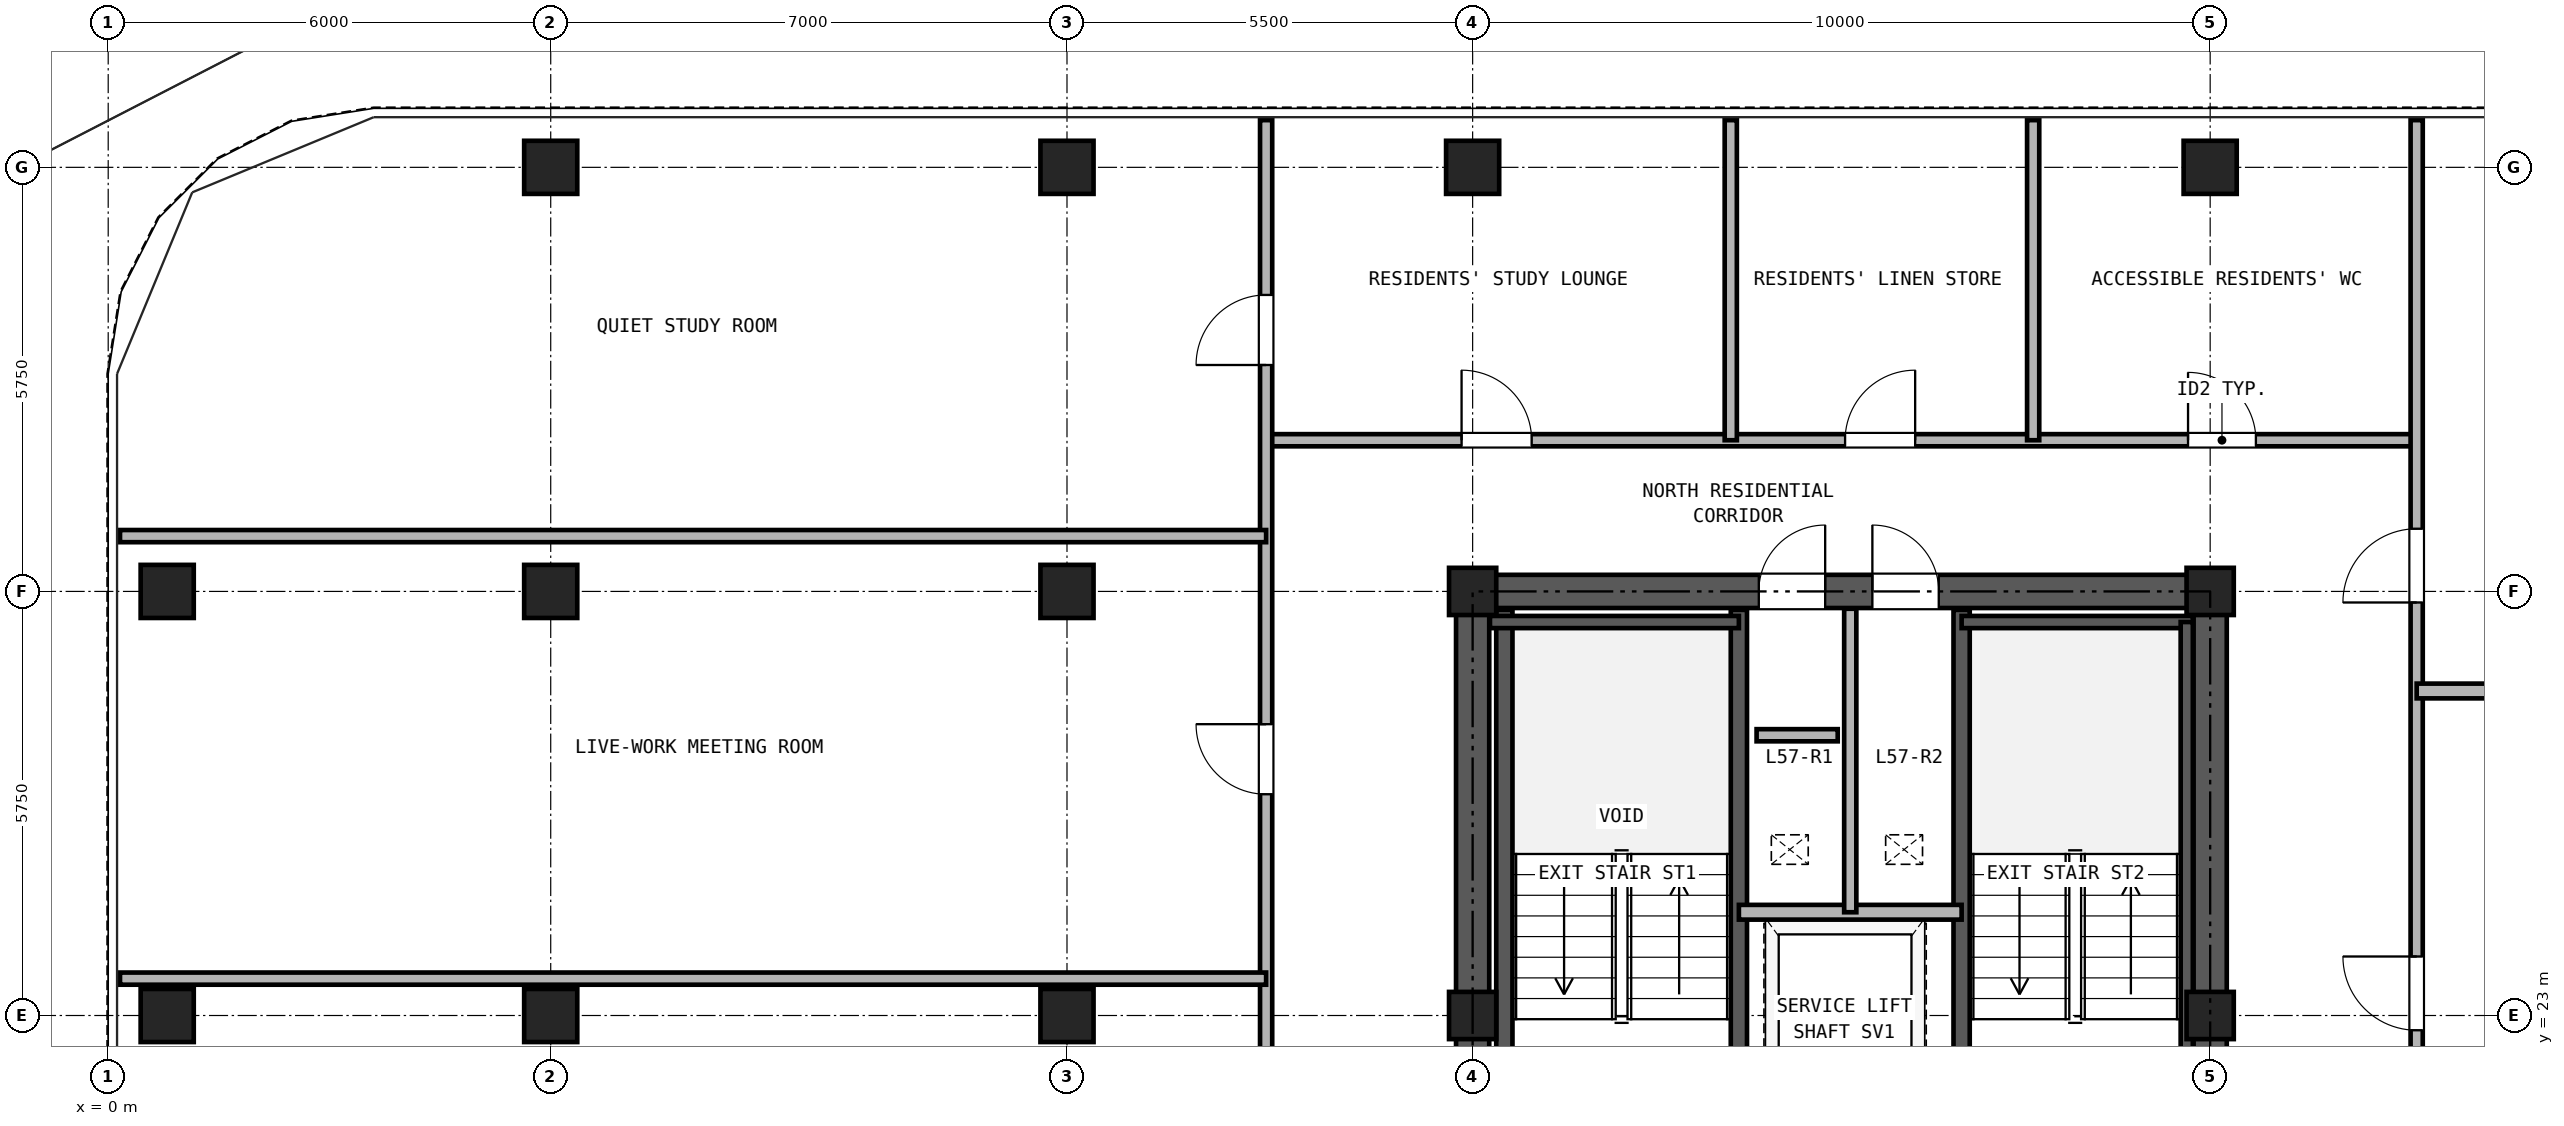
"""IFC4 building model, lengths in metres.
Left out: names, types, materials, properties, quantities, classifications, styles, units other than length and angle.
Written with IfcOpenShell. Run it as: python <this file> out.ifc"""

import sys

from ifc_helpers import new_model, si_unit, direction, frame, frame_2d, origin, origin_2d, place, context, subcontext, project, spatial, rectangle, hollow_rectangle, extrude, source, transform, mapped, element, fill, save


model = new_model("IFC4")
c1 = context("Model", 3, precision=1e-05, world=origin(), true_north=direction((0.0, 1.0)))
c2 = subcontext(c1, "Body", "Model", "MODEL_VIEW")
j1 = project(units=[si_unit("LENGTHUNIT", "METRE"), si_unit("PLANEANGLEUNIT", "RADIAN")], contexts=[c1])
p1 = place(None, origin())
s1 = spatial("IfcSite", under=j1, at=p1, CompositionType="ELEMENT")
p2 = place(p1, origin())
s2 = spatial("IfcBuilding", under=s1, at=p2, CompositionType="ELEMENT")
p3 = place(p2, frame((0.0, 0.0, 202.8)))
s3 = spatial("IfcBuildingStorey", under=s2, at=p3, CompositionType="ELEMENT", Elevation=202.8)
m1 = source(origin(), c2, "Body", "SweptSolid", [
    extrude(hollow_rectangle(XDim=0.72, YDim=0.72, WallThickness=0.04, at=origin_2d()), origin(), (0.0, 0.0, 1.0), 2.95),
])
for number, where, z_axis, x_axis in (
    (1, (6.0, 34.5, 0.0), (0.0, 0.0, 1.0), (1.0, 0.0, 0.0)),
    (2, (13.0, 34.5, 0.0), (0.0, 0.0, 1.0), (1.0, 0.0, 0.0)),
    (3, (18.5, 34.5, 0.0), (0.0, 0.0, 1.0), (1.0, 0.0, 0.0)),
    (4, (28.5, 34.5, 0.0), (0.0, 0.0, 1.0), (1.0, 0.0, 0.0)),
    (5, (0.8, 23.0, 0.0), (0.0, 0.0, 1.0), (1.0, 0.0, 0.0)),
    (6, (0.8, 28.75, 0.0), (0.0, 0.0, 1.0), (1.0, 0.0, 0.0)),
    (7, (6.0, 23.0, 0.0), (0.0, 0.0, 1.0), (1.0, 0.0, 0.0)),
    (8, (6.0, 28.75, 0.0), (0.0, 0.0, 1.0), (1.0, 0.0, 0.0)),
    (9, (13.0, 23.0, 0.0), (0.0, 0.0, 1.0), (1.0, 0.0, 0.0)),
    (10, (13.0, 28.75, 0.0), (0.0, 0.0, 1.0), (1.0, 0.0, 0.0)),
):
    element("IfcColumn", number, at=place(p3, frame(where, z_axis=z_axis, x_axis=x_axis)), inside=s3, PredefinedType="COLUMN", context=c2, shape_type="MappedRepresentation", body=[
        mapped(m1, transform((0.0, 0.0, 0.0), x_axis=(1.0, 0.0, 0.0), y_axis=(0.0, 1.0, 0.0), z_axis=(0.0, 0.0, 1.0), scale=1.0)),
    ])
m2 = source(origin(), c2, "Body", "SweptSolid", [
    extrude(hollow_rectangle(XDim=0.64, YDim=0.64, WallThickness=0.035, at=origin_2d()), origin(), (0.0, 0.0, 1.0), 2.95),
])
for number, where, z_axis, x_axis in (
    (11, (18.5, 23.0, 0.0), (0.0, 0.0, 1.0), (1.0, 0.0, 0.0)),
    (12, (18.5, 28.75, 0.0), (0.0, 0.0, 1.0), (1.0, 0.0, 0.0)),
    (13, (28.5, 23.0, 0.0), (0.0, 0.0, 1.0), (1.0, 0.0, 0.0)),
    (14, (28.5, 28.75, 0.0), (0.0, 0.0, 1.0), (1.0, 0.0, 0.0)),
):
    element("IfcColumn", number, at=place(p3, frame(where, z_axis=z_axis, x_axis=x_axis)), inside=s3, PredefinedType="COLUMN", context=c2, shape_type="MappedRepresentation", body=[
        mapped(m2, transform((0.0, 0.0, 0.0), x_axis=(1.0, 0.0, 0.0), y_axis=(0.0, 1.0, 0.0), z_axis=(0.0, 0.0, 1.0), scale=1.0)),
    ])
p4 = place(p3, frame((18.275, 28.75, 0.0), z_axis=(0.0, 0.0, 1.0), x_axis=(1.0, 0.0, 0.0)))
e15 = element("IfcWall", 15, at=p4, inside=s3, PredefinedType="SHEAR", context=c2, shape_type="SweptSolid", body=[
    extrude(rectangle(XDim=10.45, YDim=0.45, at=frame_2d((5.225, 0.0))), origin(), (0.0, 0.0, 1.0), 2.95),
])
p5 = place(p4, frame((4.105, 0.0, 0.0)))
e16 = element("IfcOpeningElement", 16, at=p5, cuts=e15, PredefinedType="OPENING", context=c2, shape_type="SweptSolid", body=[
    extrude(rectangle(XDim=0.9, YDim=2.05, at=frame_2d((0.45, 1.025))), frame((0.0, 0.235, 0.0), z_axis=(0.0, -1.0, 0.0), x_axis=(1.0, 0.0, 0.0)), (0.0, 0.0, 1.0), 0.47),
])
p6 = place(p4, frame((5.645, 0.0, 0.0)))
e17 = element("IfcOpeningElement", 17, at=p6, cuts=e15, PredefinedType="OPENING", context=c2, shape_type="SweptSolid", body=[
    extrude(rectangle(XDim=0.9, YDim=2.05, at=frame_2d((0.45, 1.025))), frame((0.0, 0.235, 0.0), z_axis=(0.0, -1.0, 0.0), x_axis=(1.0, 0.0, 0.0)), (0.0, 0.0, 1.0), 0.47),
])
p7 = place(p3, frame((18.5, 11.725, 0.0), z_axis=(0.0, 0.0, 1.0), x_axis=(0.0, 1.0, 0.0)))
e18 = element("IfcWall", 18, at=p7, inside=s3, PredefinedType="SHEAR", context=c2, shape_type="SweptSolid", body=[
    extrude(rectangle(XDim=16.8, YDim=0.45, at=frame_2d((8.4, 0.0))), origin(), (0.0, 0.0, 1.0), 2.95),
])
p8 = place(p7, frame((7.425, 0.0, 0.0)))
e19 = element("IfcOpeningElement", 19, at=p8, cuts=e18, PredefinedType="OPENING", context=c2, shape_type="SweptSolid", body=[
    extrude(rectangle(XDim=1.15, YDim=2.2, at=frame_2d((0.575, 1.1))), frame((0.0, 0.235, 0.0), z_axis=(0.0, -1.0, 0.0), x_axis=(1.0, 0.0, 0.0)), (0.0, 0.0, 1.0), 0.47),
])
p9 = place(p3, frame((28.5, 11.725, 0.0), z_axis=(0.0, 0.0, 1.0), x_axis=(0.0, 1.0, 0.0)))
e20 = element("IfcWall", 20, at=p9, inside=s3, PredefinedType="SHEAR", context=c2, shape_type="SweptSolid", body=[
    extrude(rectangle(XDim=16.8, YDim=0.45, at=frame_2d((8.4, 0.0))), origin(), (0.0, 0.0, 1.0), 2.95),
])
p10 = place(p9, frame((7.425, 0.0, 0.0)))
e21 = element("IfcOpeningElement", 21, at=p10, cuts=e20, PredefinedType="OPENING", context=c2, shape_type="SweptSolid", body=[
    extrude(rectangle(XDim=1.15, YDim=2.2, at=frame_2d((0.575, 1.1))), frame((0.0, 0.235, 0.0), z_axis=(0.0, -1.0, 0.0), x_axis=(1.0, 0.0, 0.0)), (0.0, 0.0, 1.0), 0.47),
])
for number, where, z_axis, x_axis in (
    (22, (18.93, 21.39, 0.0), (0.0, 0.0, 1.0), (0.0, 1.0, 0.0)),
    (23, (22.11, 21.39, 0.0), (0.0, 0.0, 1.0), (0.0, 1.0, 0.0)),
    (24, (25.13, 21.39, 0.0), (0.0, 0.0, 1.0), (0.0, 1.0, 0.0)),
):
    element("IfcWall", number, at=place(p3, frame(where, z_axis=z_axis, x_axis=x_axis)), inside=s3, PredefinedType="SOLIDWALL", context=c2, shape_type="SweptSolid", body=[
        extrude(rectangle(XDim=7.11, YDim=0.22, at=frame_2d((3.555, 0.0))), origin(), (0.0, 0.0, 1.0), 2.95),
    ])
p11 = place(p3, frame((18.735, 28.335, 0.0), z_axis=(0.0, 0.0, 1.0), x_axis=(1.0, 0.0, 0.0)))
e25 = element("IfcWall", 25, at=p11, inside=s3, PredefinedType="PARTITIONING", context=c2, shape_type="SweptSolid", body=[
    extrude(rectangle(XDim=3.375, YDim=0.165, at=frame_2d((1.688, 0.0))), origin(), (0.0, 0.0, 1.0), 2.95),
])
p12 = place(p3, frame((25.13, 28.335, 0.0), z_axis=(0.0, 0.0, 1.0), x_axis=(1.0, 0.0, 0.0)))
e26 = element("IfcWall", 26, at=p12, inside=s3, PredefinedType="PARTITIONING", context=c2, shape_type="SweptSolid", body=[
    extrude(rectangle(XDim=3.135, YDim=0.165, at=frame_2d((1.567, 0.0))), origin(), (0.0, 0.0, 1.0), 2.95),
])
p13 = place(p3, frame((28.183, 21.39, 0.0), z_axis=(0.0, 0.0, 1.0), x_axis=(0.0, 1.0, 0.0)))
e27 = element("IfcWall", 27, at=p13, inside=s3, PredefinedType="PARTITIONING", context=c2, shape_type="SweptSolid", body=[
    extrude(rectangle(XDim=6.945, YDim=0.165, at=frame_2d((3.473, 0.0))), origin(), (0.0, 0.0, 1.0), 2.95),
])
p14 = place(p3, frame((22.11, 24.4, 0.0), z_axis=(0.0, 0.0, 1.0), x_axis=(1.0, 0.0, 0.0)))
e28 = element("IfcWall", 28, at=p14, inside=s3, PredefinedType="PARTITIONING", context=c2, shape_type="SweptSolid", body=[
    extrude(rectangle(XDim=3.02, YDim=0.2, at=frame_2d((1.51, 0.0))), origin(), (0.0, 0.0, 1.0), 2.95),
])
p15 = place(p3, frame((23.62, 24.4, 0.0), z_axis=(0.0, 0.0, 1.0), x_axis=(0.0, 1.0, 0.0)))
e29 = element("IfcWall", 29, at=p15, inside=s3, PredefinedType="PARTITIONING", context=c2, shape_type="SweptSolid", body=[
    extrude(rectangle(XDim=4.115, YDim=0.165, at=frame_2d((2.058, 0.0))), origin(), (0.0, 0.0, 1.0), 2.95),
])
p16 = place(p3, frame((15.7, 30.8, 0.0), z_axis=(0.0, 0.0, 1.0), x_axis=(1.0, 0.0, 0.0)))
e30 = element("IfcWall", 30, at=p16, inside=s3, PredefinedType="PARTITIONING", context=c2, shape_type="SweptSolid", body=[
    extrude(rectangle(XDim=15.6, YDim=0.165, at=frame_2d((7.8, 0.0))), origin(), (0.0, 0.0, 1.0), 2.95),
])
p17 = place(p16, frame((2.65, 0.0, 0.0)))
e31 = element("IfcOpeningElement", 31, at=p17, cuts=e30, PredefinedType="OPENING", context=c2, shape_type="SweptSolid", body=[
    extrude(rectangle(XDim=0.95, YDim=2.15, at=frame_2d((0.475, 1.075))), frame((0.0, 0.093, 0.0), z_axis=(0.0, -1.0, 0.0), x_axis=(1.0, 0.0, 0.0)), (0.0, 0.0, 1.0), 0.185),
])
p18 = place(p16, frame((7.85, 0.0, 0.0)))
e32 = element("IfcOpeningElement", 32, at=p18, cuts=e30, PredefinedType="OPENING", context=c2, shape_type="SweptSolid", body=[
    extrude(rectangle(XDim=0.95, YDim=2.15, at=frame_2d((0.475, 1.075))), frame((0.0, 0.093, 0.0), z_axis=(0.0, -1.0, 0.0), x_axis=(1.0, 0.0, 0.0)), (0.0, 0.0, 1.0), 0.185),
])
p19 = place(p16, frame((12.5, 0.0, 0.0)))
e33 = element("IfcOpeningElement", 33, at=p19, cuts=e30, PredefinedType="OPENING", context=c2, shape_type="SweptSolid", body=[
    extrude(rectangle(XDim=0.92, YDim=2.1, at=frame_2d((0.46, 1.05))), frame((0.0, 0.093, 0.0), z_axis=(0.0, -1.0, 0.0), x_axis=(1.0, 0.0, 0.0)), (0.0, 0.0, 1.0), 0.185),
])
p20 = place(p3, frame((15.7, 10.85, 0.0), z_axis=(0.0, 0.0, 1.0), x_axis=(0.0, 1.0, 0.0)))
e34 = element("IfcWall", 34, at=p20, inside=s3, PredefinedType="PARTITIONING", context=c2, shape_type="SweptSolid", body=[
    extrude(rectangle(XDim=24.29, YDim=0.165, at=frame_2d((12.145, 0.0))), origin(), (0.0, 0.0, 1.0), 2.95),
])
p21 = place(p20, frame((2.825, 0.0, 0.0)))
e35 = element("IfcOpeningElement", 35, at=p21, cuts=e34, PredefinedType="OPENING", context=c2, shape_type="SweptSolid", body=[
    extrude(rectangle(XDim=0.95, YDim=2.15, at=frame_2d((0.475, 1.075))), frame((0.0, 0.093, 0.0), z_axis=(0.0, -1.0, 0.0), x_axis=(1.0, 0.0, 0.0)), (0.0, 0.0, 1.0), 0.185),
])
p22 = place(p20, frame((9.15, 0.0, 0.0)))
e36 = element("IfcOpeningElement", 36, at=p22, cuts=e34, PredefinedType="OPENING", context=c2, shape_type="SweptSolid", body=[
    extrude(rectangle(XDim=0.95, YDim=2.15, at=frame_2d((0.475, 1.075))), frame((0.0, 0.093, 0.0), z_axis=(0.0, -1.0, 0.0), x_axis=(1.0, 0.0, 0.0)), (0.0, 0.0, 1.0), 0.185),
])
p23 = place(p20, frame((15.15, 0.0, 0.0)))
e37 = element("IfcOpeningElement", 37, at=p23, cuts=e34, PredefinedType="OPENING", context=c2, shape_type="SweptSolid", body=[
    extrude(rectangle(XDim=0.95, YDim=2.15, at=frame_2d((0.475, 1.075))), frame((0.0, 0.093, 0.0), z_axis=(0.0, -1.0, 0.0), x_axis=(1.0, 0.0, 0.0)), (0.0, 0.0, 1.0), 0.185),
])
p24 = place(p20, frame((20.97, 0.0, 0.0)))
e38 = element("IfcOpeningElement", 38, at=p24, cuts=e34, PredefinedType="OPENING", context=c2, shape_type="SweptSolid", body=[
    extrude(rectangle(XDim=0.95, YDim=2.15, at=frame_2d((0.475, 1.075))), frame((0.0, 0.093, 0.0), z_axis=(0.0, -1.0, 0.0), x_axis=(1.0, 0.0, 0.0)), (0.0, 0.0, 1.0), 0.185),
])
p25 = place(p3, frame((31.3, 10.85, 0.0), z_axis=(0.0, 0.0, 1.0), x_axis=(0.0, 1.0, 0.0)))
e39 = element("IfcWall", 39, at=p25, inside=s3, PredefinedType="PARTITIONING", context=c2, shape_type="SweptSolid", body=[
    extrude(rectangle(XDim=24.29, YDim=0.165, at=frame_2d((12.145, 0.0))), origin(), (0.0, 0.0, 1.0), 2.95),
])
p26 = place(p25, frame((3.675, 0.0, 0.0)))
e40 = element("IfcOpeningElement", 40, at=p26, cuts=e39, PredefinedType="OPENING", context=c2, shape_type="SweptSolid", body=[
    extrude(rectangle(XDim=1.0, YDim=2.15, at=frame_2d((0.5, 1.075))), frame((0.0, 0.093, 0.0), z_axis=(0.0, -1.0, 0.0), x_axis=(1.0, 0.0, 0.0)), (0.0, 0.0, 1.0), 0.185),
])
p27 = place(p25, frame((11.95, 0.0, 0.0)))
e41 = element("IfcOpeningElement", 41, at=p27, cuts=e39, PredefinedType="OPENING", context=c2, shape_type="SweptSolid", body=[
    extrude(rectangle(XDim=1.0, YDim=2.15, at=frame_2d((0.5, 1.075))), frame((0.0, 0.093, 0.0), z_axis=(0.0, -1.0, 0.0), x_axis=(1.0, 0.0, 0.0)), (0.0, 0.0, 1.0), 0.185),
])
p28 = place(p25, frame((17.75, 0.0, 0.0)))
e42 = element("IfcOpeningElement", 42, at=p28, cuts=e39, PredefinedType="OPENING", context=c2, shape_type="SweptSolid", body=[
    extrude(rectangle(XDim=1.0, YDim=2.15, at=frame_2d((0.5, 1.075))), frame((0.0, 0.093, 0.0), z_axis=(0.0, -1.0, 0.0), x_axis=(1.0, 0.0, 0.0)), (0.0, 0.0, 1.0), 0.185),
])
for number, where, z_axis, x_axis in (
    (43, (0.16, 23.5, 0.0), (0.0, 0.0, 1.0), (1.0, 0.0, 0.0)),
    (44, (0.16, 29.5, 0.0), (0.0, 0.0, 1.0), (1.0, 0.0, 0.0)),
):
    element("IfcWall", number, at=place(p3, frame(where, z_axis=z_axis, x_axis=x_axis)), inside=s3, PredefinedType="PARTITIONING", context=c2, shape_type="SweptSolid", body=[
        extrude(rectangle(XDim=15.54, YDim=0.165, at=frame_2d((7.77, 0.0))), origin(), (0.0, 0.0, 1.0), 2.95),
    ])
p29 = place(p3, frame((31.3, 27.4, 0.0), z_axis=(0.0, 0.0, 1.0), x_axis=(1.0, 0.0, 0.0)))
e45 = element("IfcWall", 45, at=p29, inside=s3, PredefinedType="PARTITIONING", context=c2, shape_type="SweptSolid", body=[
    extrude(rectangle(XDim=10.34, YDim=0.2, at=frame_2d((5.17, 0.0))), origin(), (0.0, 0.0, 1.0), 2.95),
])
for number, where, z_axis, x_axis in (
    (46, (22.0, 30.8, 0.0), (0.0, 0.0, 1.0), (0.0, 1.0, 0.0)),
    (47, (26.1, 30.8, 0.0), (0.0, 0.0, 1.0), (0.0, 1.0, 0.0)),
):
    element("IfcWall", number, at=place(p3, frame(where, z_axis=z_axis, x_axis=x_axis)), inside=s3, PredefinedType="PARTITIONING", context=c2, shape_type="SweptSolid", body=[
        extrude(rectangle(XDim=4.34, YDim=0.165, at=frame_2d((2.17, 0.0))), origin(), (0.0, 0.0, 1.0), 2.95),
    ])
p30 = place(p3, frame((22.35, 26.8, 0.0), z_axis=(0.0, 0.0, 1.0), x_axis=(1.0, 0.0, 0.0)))
e48 = element("IfcWall", 48, at=p30, inside=s3, PredefinedType="PARTITIONING", context=c2, shape_type="SweptSolid", body=[
    extrude(rectangle(XDim=1.1, YDim=0.165, at=frame_2d((0.55, 0.0))), origin(), (0.0, 0.0, 1.0), 2.95),
])
p31 = place(p5, origin())
e49 = element("IfcDoor", 49, at=p31, inside=s3, OperationType="SINGLE_SWING_RIGHT", PredefinedType="DOOR", context=c2, shape_type="SweptSolid", body=[
    extrude(rectangle(XDim=0.9, YDim=2.05, at=frame_2d((0.45, 1.025))), frame((0.0, 0.025, 0.0), z_axis=(0.0, -1.0, 0.0), x_axis=(1.0, 0.0, 0.0)), (0.0, 0.0, 1.0), 0.05),
])
fill(e16, e49)
p32 = place(p6, origin())
e50 = element("IfcDoor", 50, at=p32, inside=s3, OperationType="SINGLE_SWING_LEFT", PredefinedType="DOOR", context=c2, shape_type="SweptSolid", body=[
    extrude(rectangle(XDim=0.9, YDim=2.05, at=frame_2d((0.45, 1.025))), frame((0.0, 0.025, 0.0), z_axis=(0.0, -1.0, 0.0), x_axis=(1.0, 0.0, 0.0)), (0.0, 0.0, 1.0), 0.05),
])
fill(e17, e50)
p33 = place(p23, frame((0.95, 0.0, 0.0), z_axis=(0.0, 0.0, 1.0), x_axis=(-1.0, 0.0, 0.0)))
e51 = element("IfcDoor", 51, at=p33, inside=s3, OperationType="SINGLE_SWING_RIGHT", PredefinedType="DOOR", context=c2, shape_type="SweptSolid", body=[
    extrude(rectangle(XDim=0.95, YDim=2.15, at=frame_2d((0.475, 1.075))), frame((0.0, 0.025, 0.0), z_axis=(0.0, -1.0, 0.0), x_axis=(1.0, 0.0, 0.0)), (0.0, 0.0, 1.0), 0.05),
])
fill(e37, e51)
p34 = place(p24, frame((0.95, 0.0, 0.0), z_axis=(0.0, 0.0, 1.0), x_axis=(-1.0, 0.0, 0.0)))
e52 = element("IfcDoor", 52, at=p34, inside=s3, OperationType="SINGLE_SWING_LEFT", PredefinedType="DOOR", context=c2, shape_type="SweptSolid", body=[
    extrude(rectangle(XDim=0.95, YDim=2.15, at=frame_2d((0.475, 1.075))), frame((0.0, 0.025, 0.0), z_axis=(0.0, -1.0, 0.0), x_axis=(1.0, 0.0, 0.0)), (0.0, 0.0, 1.0), 0.05),
])
fill(e38, e52)
p35 = place(p27, frame((1.0, 0.0, 0.0), z_axis=(0.0, 0.0, 1.0), x_axis=(-1.0, 0.0, 0.0)))
e53 = element("IfcDoor", 53, at=p35, inside=s3, OperationType="SINGLE_SWING_RIGHT", PredefinedType="DOOR", context=c2, shape_type="SweptSolid", body=[
    extrude(rectangle(XDim=1.0, YDim=2.15, at=frame_2d((0.5, 1.075))), frame((0.0, 0.025, 0.0), z_axis=(0.0, -1.0, 0.0), x_axis=(1.0, 0.0, 0.0)), (0.0, 0.0, 1.0), 0.05),
])
fill(e41, e53)
p36 = place(p28, frame((1.0, 0.0, 0.0), z_axis=(0.0, 0.0, 1.0), x_axis=(-1.0, 0.0, 0.0)))
e54 = element("IfcDoor", 54, at=p36, inside=s3, OperationType="SINGLE_SWING_LEFT", PredefinedType="DOOR", context=c2, shape_type="SweptSolid", body=[
    extrude(rectangle(XDim=1.0, YDim=2.15, at=frame_2d((0.5, 1.075))), frame((0.0, 0.025, 0.0), z_axis=(0.0, -1.0, 0.0), x_axis=(1.0, 0.0, 0.0)), (0.0, 0.0, 1.0), 0.05),
])
fill(e42, e54)
p37 = place(p17, origin())
e55 = element("IfcDoor", 55, at=p37, inside=s3, OperationType="SINGLE_SWING_LEFT", PredefinedType="DOOR", context=c2, shape_type="SweptSolid", body=[
    extrude(rectangle(XDim=0.95, YDim=2.15, at=frame_2d((0.475, 1.075))), frame((0.0, 0.025, 0.0), z_axis=(0.0, -1.0, 0.0), x_axis=(1.0, 0.0, 0.0)), (0.0, 0.0, 1.0), 0.05),
])
fill(e31, e55)
p38 = place(p18, origin())
e56 = element("IfcDoor", 56, at=p38, inside=s3, OperationType="SINGLE_SWING_RIGHT", PredefinedType="DOOR", context=c2, shape_type="SweptSolid", body=[
    extrude(rectangle(XDim=0.95, YDim=2.15, at=frame_2d((0.475, 1.075))), frame((0.0, 0.025, 0.0), z_axis=(0.0, -1.0, 0.0), x_axis=(1.0, 0.0, 0.0)), (0.0, 0.0, 1.0), 0.05),
])
fill(e32, e56)
p39 = place(p19, origin())
e57 = element("IfcDoor", 57, at=p39, inside=s3, OperationType="SINGLE_SWING_LEFT", PredefinedType="DOOR", context=c2, shape_type="SweptSolid", body=[
    extrude(rectangle(XDim=0.92, YDim=2.1, at=frame_2d((0.46, 1.05))), frame((0.0, 0.025, 0.0), z_axis=(0.0, -1.0, 0.0), x_axis=(1.0, 0.0, 0.0)), (0.0, 0.0, 1.0), 0.05),
])
fill(e33, e57)
save(model, sys.argv[1])
